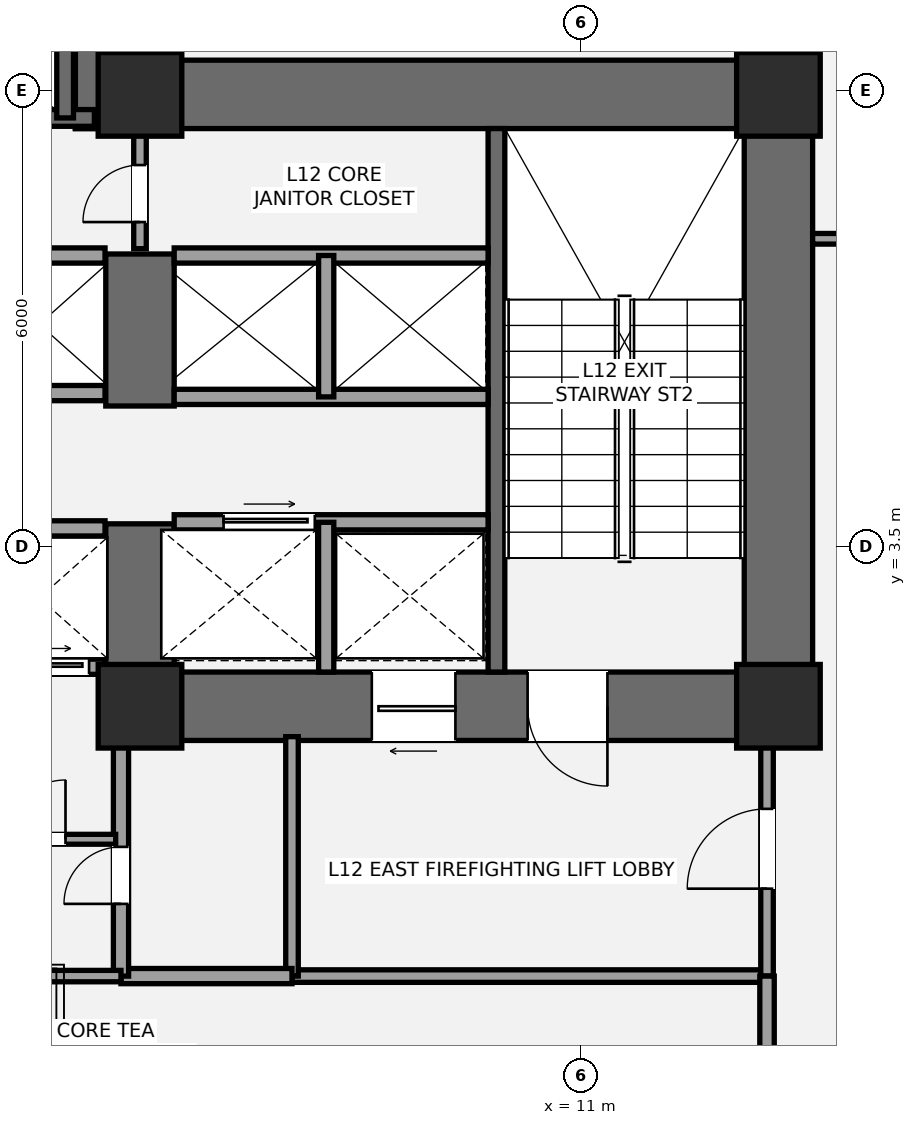
"""IFC4 building model, lengths in metres.
Left out: names, types, materials, properties, quantities, classifications, styles, units other than length and angle.
Written with IfcOpenShell. Run it as: python <this file> out.ifc"""

import sys

from ifc_helpers import new_model, si_unit, direction, frame, frame_2d, origin, origin_2d, place, context, subcontext, project, spatial, rectangle, extrude, element, fill, save


model = new_model("IFC4")
c1 = context("Model", 3, precision=1e-05, world=origin(), true_north=direction((0.0, 1.0)))
c2 = subcontext(c1, "Body", "Model", "MODEL_VIEW")
j1 = project(units=[si_unit("LENGTHUNIT", "METRE"), si_unit("PLANEANGLEUNIT", "RADIAN")], contexts=[c1])
p1 = place(None, origin())
s1 = spatial("IfcSite", under=j1, at=p1, CompositionType="ELEMENT")
p2 = place(p1, origin())
s2 = spatial("IfcBuilding", under=s1, at=p2, CompositionType="ELEMENT")
p3 = place(p2, frame((0.0, 0.0, 48.6)))
s3 = spatial("IfcBuildingStorey", under=s2, at=p3, CompositionType="ELEMENT", Elevation=48.6)
p4 = place(p3, frame((13.6, 0.95, 0.0), z_axis=(0.0, 0.0, 1.0), x_axis=(0.0, 1.0, 0.0)))
e1 = element("IfcWall", 1, at=p4, inside=s3, PredefinedType="SHEAR", context=c2, shape_type="SweptSolid", body=[
    extrude(rectangle(XDim=8.95, YDim=0.9, at=frame_2d((4.475, 0.0))), origin(), (0.0, 0.0, 1.0), 3.6),
])
p5 = place(p3, frame((4.35, 9.45, 0.0), z_axis=(0.0, 0.0, 1.0), x_axis=(1.0, 0.0, 0.0)))
e2 = element("IfcWall", 2, at=p5, inside=s3, PredefinedType="SHEAR", context=c2, shape_type="SweptSolid", body=[
    extrude(rectangle(XDim=9.7, YDim=0.9, at=frame_2d((4.85, 0.0))), origin(), (0.0, 0.0, 1.0), 3.6),
])
p6 = place(p3, frame((14.05, 1.4, 0.0), z_axis=(0.0, 0.0, 1.0), x_axis=(-1.0, 0.0, 0.0)))
e3 = element("IfcWall", 3, at=p6, inside=s3, PredefinedType="SHEAR", context=c2, shape_type="SweptSolid", body=[
    extrude(rectangle(XDim=9.3, YDim=0.9, at=frame_2d((4.65, 0.0))), origin(), (0.0, 0.0, 1.0), 3.6),
])
p7 = place(p6, frame((2.7, 0.0, 0.0)))
e4 = element("IfcOpeningElement", 4, at=p7, cuts=e3, PredefinedType="OPENING", context=c2, shape_type="SweptSolid", body=[
    extrude(rectangle(XDim=1.05, YDim=2.15, at=frame_2d((0.525, 1.075))), frame((0.0, 0.46, 0.0), z_axis=(0.0, -1.0, 0.0), x_axis=(1.0, 0.0, 0.0)), (0.0, 0.0, 1.0), 0.92),
])
p8 = place(p6, frame((4.7, 0.0, 0.0)))
e5 = element("IfcOpeningElement", 5, at=p8, cuts=e3, PredefinedType="OPENING", context=c2, shape_type="SweptSolid", body=[
    extrude(rectangle(XDim=1.1, YDim=2.2, at=frame_2d((0.55, 1.1))), frame((0.0, 0.46, 0.0), z_axis=(0.0, -1.0, 0.0), x_axis=(1.0, 0.0, 0.0)), (0.0, 0.0, 1.0), 0.92),
])
p9 = place(p3, frame((5.2, 0.95, 0.0), z_axis=(0.0, 0.0, 1.0), x_axis=(0.0, 1.0, 0.0)))
e6 = element("IfcWall", 6, at=p9, inside=s3, PredefinedType="SHEAR", context=c2, shape_type="SweptSolid", body=[
    extrude(rectangle(XDim=2.85, YDim=0.9, at=frame_2d((1.425, 0.0))), origin(), (0.0, 0.0, 1.0), 3.6),
])
p10 = place(p3, frame((5.2, 5.35, 0.0), z_axis=(0.0, 0.0, 1.0), x_axis=(0.0, 1.0, 0.0)))
e7 = element("IfcWall", 7, at=p10, inside=s3, PredefinedType="SHEAR", context=c2, shape_type="SweptSolid", body=[
    extrude(rectangle(XDim=2.0, YDim=0.9, at=frame_2d((1.0, 0.0))), origin(), (0.0, 0.0, 1.0), 3.6),
])
p11 = place(p3, frame((9.89, 1.85, 0.0), z_axis=(0.0, 0.0, 1.0), x_axis=(0.0, 1.0, 0.0)))
e8 = element("IfcWall", 8, at=p11, inside=s3, PredefinedType="SHEAR", context=c2, shape_type="SweptSolid", body=[
    extrude(rectangle(XDim=7.15, YDim=0.22, at=frame_2d((3.575, 0.0))), origin(), (0.0, 0.0, 1.0), 3.6),
])
p12 = place(p3, frame((4.8, 9.0, 0.0), z_axis=(0.0, 0.0, 1.0), x_axis=(0.0, 1.0, 0.0)))
e9 = element("IfcWall", 9, at=p12, inside=s3, PredefinedType="SHEAR", context=c2, shape_type="SweptSolid", body=[
    extrude(rectangle(XDim=4.3, YDim=0.9, at=frame_2d((2.15, 0.0))), origin(), (0.0, 0.0, 1.0), 3.6),
])
p13 = place(p3, frame((-4.7, 9.14, 0.0), z_axis=(0.0, 0.0, 1.0), x_axis=(1.0, 0.0, 0.0)))
e10 = element("IfcWall", 10, at=p13, inside=s3, PredefinedType="SHEAR", context=c2, shape_type="SweptSolid", body=[
    extrude(rectangle(XDim=9.3, YDim=0.22, at=frame_2d((4.65, 0.0))), origin(), (0.0, 0.0, 1.0), 3.6),
])
p14 = place(p13, frame((1.15, 0.0, 0.0)))
e11 = element("IfcOpeningElement", 11, at=p14, cuts=e10, PredefinedType="OPENING", context=c2, shape_type="SweptSolid", body=[
    extrude(rectangle(XDim=1.05, YDim=2.15, at=frame_2d((0.525, 1.075))), frame((0.0, 0.12, 0.0), z_axis=(0.0, -1.0, 0.0), x_axis=(1.0, 0.0, 0.0)), (0.0, 0.0, 1.0), 0.24),
])
p15 = place(p3, frame((4.215, 9.14, 0.0), z_axis=(0.0, 0.0, 1.0), x_axis=(0.0, 1.0, 0.0)))
e12 = element("IfcWall", 12, at=p15, inside=s3, PredefinedType="SHEAR", context=c2, shape_type="SweptSolid", body=[
    extrude(rectangle(XDim=3.26, YDim=0.22, at=frame_2d((1.63, 0.0))), origin(), (0.0, 0.0, 1.0), 3.6),
])
for number, where, z_axis, x_axis in (
    (13, (5.2, 1.4, 0.0), (0.0, 0.0, 1.0), (1.0, 0.0, 0.0)),
    (14, (5.2, 9.45, 0.0), (0.0, 0.0, 1.0), (1.0, 0.0, 0.0)),
    (15, (13.6, 1.4, 0.0), (0.0, 0.0, 1.0), (1.0, 0.0, 0.0)),
    (16, (13.6, 9.45, 0.0), (0.0, 0.0, 1.0), (1.0, 0.0, 0.0)),
):
    element("IfcColumn", number, at=place(p3, frame(where, z_axis=z_axis, x_axis=x_axis)), inside=s3, PredefinedType="COLUMN", context=c2, shape_type="SweptSolid", body=[
        extrude(rectangle(XDim=1.1, YDim=1.1, at=origin_2d()), origin(), (0.0, 0.0, 1.0), 3.6),
    ])
p16 = place(p3, frame((7.2, -2.15, 0.0), z_axis=(0.0, 0.0, 1.0), x_axis=(1.0, 0.0, 0.0)))
e17 = element("IfcWall", 17, at=p16, inside=s3, PredefinedType="PARTITIONING", context=c2, shape_type="SweptSolid", body=[
    extrude(rectangle(XDim=6.25, YDim=0.165, at=frame_2d((3.125, 0.0))), origin(), (0.0, 0.0, 1.0), 3.4),
])
p17 = place(p3, frame((7.2, -2.15, 0.0), z_axis=(0.0, 0.0, 1.0), x_axis=(0.0, 1.0, 0.0)))
e18 = element("IfcWall", 18, at=p17, inside=s3, PredefinedType="PARTITIONING", context=c2, shape_type="SweptSolid", body=[
    extrude(rectangle(XDim=3.15, YDim=0.165, at=frame_2d((1.575, 0.0))), origin(), (0.0, 0.0, 1.0), 2.853),
])
p18 = place(p3, frame((13.45, -2.15, 0.0), z_axis=(0.0, 0.0, 1.0), x_axis=(0.0, 1.0, 0.0)))
e19 = element("IfcWall", 19, at=p18, inside=s3, PredefinedType="PARTITIONING", context=c2, shape_type="SweptSolid", body=[
    extrude(rectangle(XDim=3.15, YDim=0.165, at=frame_2d((1.575, 0.0))), origin(), (0.0, 0.0, 1.0), 2.853),
])
p19 = place(p18, frame((1.15, 0.0, 0.0)))
e20 = element("IfcOpeningElement", 20, at=p19, cuts=e19, PredefinedType="OPENING", context=c2, shape_type="SweptSolid", body=[
    extrude(rectangle(XDim=1.05, YDim=2.15, at=frame_2d((0.525, 1.075))), frame((0.0, 0.093, 0.0), z_axis=(0.0, -1.0, 0.0), x_axis=(1.0, 0.0, 0.0)), (0.0, 0.0, 1.0), 0.185),
])
p20 = place(p3, frame((4.95, -2.15, 0.0), z_axis=(0.0, 0.0, 1.0), x_axis=(1.0, 0.0, 0.0)))
e21 = element("IfcWall", 21, at=p20, inside=s3, PredefinedType="SOLIDWALL", context=c2, shape_type="SweptSolid", body=[
    extrude(rectangle(XDim=2.25, YDim=0.2, at=frame_2d((1.125, 0.0))), origin(), (0.0, 0.0, 1.0), 3.4),
])
p21 = place(p3, frame((4.95, -2.15, 0.0), z_axis=(0.0, 0.0, 1.0), x_axis=(0.0, 1.0, 0.0)))
e22 = element("IfcWall", 22, at=p21, inside=s3, PredefinedType="SOLIDWALL", context=c2, shape_type="SweptSolid", body=[
    extrude(rectangle(XDim=3.15, YDim=0.2, at=frame_2d((1.575, 0.0))), origin(), (0.0, 0.0, 1.0), 3.4),
])
p22 = place(p21, frame((0.95, 0.0, 0.0)))
e23 = element("IfcOpeningElement", 23, at=p22, cuts=e22, PredefinedType="OPENING", context=c2, shape_type="SweptSolid", body=[
    extrude(rectangle(XDim=0.75, YDim=2.1, at=frame_2d((0.375, 1.05))), frame((0.0, 0.11, 0.0), z_axis=(0.0, -1.0, 0.0), x_axis=(1.0, 0.0, 0.0)), (0.0, 0.0, 1.0), 0.22),
])
p23 = place(p3, frame((2.89, -0.35, 0.0), z_axis=(0.0, 0.0, 1.0), x_axis=(1.0, 0.0, 0.0)))
e24 = element("IfcWall", 24, at=p23, inside=s3, PredefinedType="PARTITIONING", context=c2, shape_type="SweptSolid", body=[
    extrude(rectangle(XDim=1.99, YDim=0.13, at=frame_2d((0.995, 0.0))), origin(), (0.0, 0.0, 1.0), 3.4),
])
p24 = place(p23, frame((0.55, 0.0, 0.0)))
e25 = element("IfcOpeningElement", 25, at=p24, cuts=e24, PredefinedType="OPENING", context=c2, shape_type="SweptSolid", body=[
    extrude(rectangle(XDim=0.78, YDim=2.1, at=frame_2d((0.39, 1.05))), frame((0.0, 0.075, 0.0), z_axis=(0.0, -1.0, 0.0), x_axis=(1.0, 0.0, 0.0)), (0.0, 0.0, 1.0), 0.15),
])
p25 = place(p3, frame((5.65, 3.82, 0.0), z_axis=(0.0, 0.0, 1.0), x_axis=(1.0, 0.0, 0.0)))
e26 = element("IfcWall", 26, at=p25, inside=s3, PredefinedType="SOLIDWALL", context=c2, shape_type="SweptSolid", body=[
    extrude(rectangle(XDim=4.13, YDim=0.2, at=frame_2d((2.065, 0.0))), origin(), (0.0, 0.0, 1.0), 3.4),
])
p26 = place(p25, frame((0.65, 0.0, 0.0)))
e27 = element("IfcOpeningElement", 27, at=p26, cuts=e26, PredefinedType="OPENING", context=c2, shape_type="SweptSolid", body=[
    extrude(rectangle(XDim=1.2, YDim=2.2, at=frame_2d((0.6, 1.1))), frame((0.0, 0.11, 0.0), z_axis=(0.0, -1.0, 0.0), x_axis=(1.0, 0.0, 0.0)), (0.0, 0.0, 1.0), 0.22),
])
p27 = place(p3, frame((7.65, 1.85, 0.0), z_axis=(0.0, 0.0, 1.0), x_axis=(0.0, 1.0, 0.0)))
e28 = element("IfcWall", 28, at=p27, inside=s3, PredefinedType="SOLIDWALL", context=c2, shape_type="SweptSolid", body=[
    extrude(rectangle(XDim=1.97, YDim=0.2, at=frame_2d((0.985, 0.0))), origin(), (0.0, 0.0, 1.0), 3.4),
])
for number, where, z_axis, x_axis in (
    (29, (5.65, 5.47, 0.0), (0.0, 0.0, 1.0), (1.0, 0.0, 0.0)),
    (30, (5.65, 7.33, 0.0), (0.0, 0.0, 1.0), (1.0, 0.0, 0.0)),
):
    element("IfcWall", number, at=place(p3, frame(where, z_axis=z_axis, x_axis=x_axis)), inside=s3, PredefinedType="SOLIDWALL", context=c2, shape_type="SweptSolid", body=[
        extrude(rectangle(XDim=4.13, YDim=0.2, at=frame_2d((2.065, 0.0))), origin(), (0.0, 0.0, 1.0), 3.4),
    ])
p28 = place(p3, frame((7.65, 5.47, 0.0), z_axis=(0.0, 0.0, 1.0), x_axis=(0.0, 1.0, 0.0)))
e31 = element("IfcWall", 31, at=p28, inside=s3, PredefinedType="SOLIDWALL", context=c2, shape_type="SweptSolid", body=[
    extrude(rectangle(XDim=1.86, YDim=0.2, at=frame_2d((0.93, 0.0))), origin(), (0.0, 0.0, 1.0), 3.4),
])
p29 = place(p3, frame((0.88, 1.92, 0.0), z_axis=(0.0, 0.0, 1.0), x_axis=(1.0, 0.0, 0.0)))
e32 = element("IfcWall", 32, at=p29, inside=s3, PredefinedType="SOLIDWALL", context=c2, shape_type="SweptSolid", body=[
    extrude(rectangle(XDim=3.86, YDim=0.2, at=frame_2d((1.93, 0.0))), origin(), (0.0, 0.0, 1.0), 2.39),
])
p30 = place(p29, frame((0.55, 0.0, 0.0)))
e33 = element("IfcOpeningElement", 33, at=p30, cuts=e32, PredefinedType="OPENING", context=c2, shape_type="SweptSolid", body=[
    extrude(rectangle(XDim=1.1, YDim=2.2, at=frame_2d((0.55, 1.1))), frame((0.0, 0.11, 0.0), z_axis=(0.0, -1.0, 0.0), x_axis=(1.0, 0.0, 0.0)), (0.0, 0.0, 1.0), 0.22),
])
p31 = place(p29, frame((2.55, 0.0, 0.0)))
e34 = element("IfcOpeningElement", 34, at=p31, cuts=e32, PredefinedType="OPENING", context=c2, shape_type="SweptSolid", body=[
    extrude(rectangle(XDim=1.1, YDim=2.2, at=frame_2d((0.55, 1.1))), frame((0.0, 0.11, 0.0), z_axis=(0.0, -1.0, 0.0), x_axis=(1.0, 0.0, 0.0)), (0.0, 0.0, 1.0), 0.22),
])
for number, where, z_axis, x_axis in (
    (35, (0.88, 3.74, 0.0), (0.0, 0.0, 1.0), (1.0, 0.0, 0.0)),
    (36, (0.88, 5.52, 0.0), (0.0, 0.0, 1.0), (1.0, 0.0, 0.0)),
    (37, (0.88, 7.33, 0.0), (0.0, 0.0, 1.0), (1.0, 0.0, 0.0)),
):
    element("IfcWall", number, at=place(p3, frame(where, z_axis=z_axis, x_axis=x_axis)), inside=s3, PredefinedType="SOLIDWALL", context=c2, shape_type="SweptSolid", body=[
        extrude(rectangle(XDim=3.86, YDim=0.2, at=frame_2d((1.93, 0.0))), origin(), (0.0, 0.0, 1.0), 3.4),
    ])
p32 = place(p3, frame((5.2, 7.42, 0.0), z_axis=(0.0, 0.0, 1.0), x_axis=(0.0, 1.0, 0.0)))
e38 = element("IfcWall", 38, at=p32, inside=s3, PredefinedType="PARTITIONING", context=c2, shape_type="SweptSolid", body=[
    extrude(rectangle(XDim=1.58, YDim=0.165, at=frame_2d((0.79, 0.0))), origin(), (0.0, 0.0, 1.0), 3.4),
])
p33 = place(p32, frame((0.35, 0.0, 0.0)))
e39 = element("IfcOpeningElement", 39, at=p33, cuts=e38, PredefinedType="OPENING", context=c2, shape_type="SweptSolid", body=[
    extrude(rectangle(XDim=0.75, YDim=2.1, at=frame_2d((0.375, 1.05))), frame((0.0, 0.093, 0.0), z_axis=(0.0, -1.0, 0.0), x_axis=(1.0, 0.0, 0.0)), (0.0, 0.0, 1.0), 0.185),
])
p34 = place(p3, frame((2.1, -2.15, 0.0), z_axis=(0.0, 0.0, 1.0), x_axis=(1.0, 0.0, 0.0)))
e40 = element("IfcWall", 40, at=p34, inside=s3, PredefinedType="PLUMBINGWALL", context=c2, shape_type="SweptSolid", body=[
    extrude(rectangle(XDim=2.85, YDim=0.15, at=frame_2d((1.425, 0.0))), origin(), (0.0, 0.0, 1.0), 3.4),
])
p35 = place(p3, frame((13.45, -4.05, 0.0), z_axis=(0.0, 0.0, 1.0), x_axis=(0.0, 1.0, 0.0)))
e41 = element("IfcWall", 41, at=p35, inside=s3, PredefinedType="PLUMBINGWALL", context=c2, shape_type="SweptSolid", body=[
    extrude(rectangle(XDim=1.9, YDim=0.19, at=frame_2d((0.95, 0.0))), origin(), (0.0, 0.0, 1.0), 2.853),
])
p36 = place(p3, frame((14.05, 7.55, 0.0), z_axis=(0.0, 0.0, 1.0), x_axis=(1.0, 0.0, 0.0)))
e42 = element("IfcWall", 42, at=p36, inside=s3, PredefinedType="PARTITIONING", context=c2, shape_type="SweptSolid", body=[
    extrude(rectangle(XDim=10.806, YDim=0.14, at=frame_2d((5.403, 0.0))), origin(), (0.0, 0.0, 1.0), 2.853),
])
p37 = place(p36, frame((1.2, 0.0, 0.0)))
e43 = element("IfcOpeningElement", 43, at=p37, cuts=e42, PredefinedType="OPENING", context=c2, shape_type="SweptSolid", body=[
    extrude(rectangle(XDim=0.92, YDim=2.15, at=frame_2d((0.46, 1.075))), frame((0.0, 0.08, 0.0), z_axis=(0.0, -1.0, 0.0), x_axis=(1.0, 0.0, 0.0)), (0.0, 0.0, 1.0), 0.16),
])
p38 = place(p7, origin())
e44 = element("IfcDoor", 44, at=p38, inside=s3, OperationType="SINGLE_SWING_LEFT", PredefinedType="DOOR", context=c2, shape_type="SweptSolid", body=[
    extrude(rectangle(XDim=1.05, YDim=2.15, at=frame_2d((0.525, 1.075))), frame((0.0, 0.025, 0.0), z_axis=(0.0, -1.0, 0.0), x_axis=(1.0, 0.0, 0.0)), (0.0, 0.0, 1.0), 0.05),
])
fill(e4, e44)
p39 = place(p19, origin())
e45 = element("IfcDoor", 45, at=p39, inside=s3, OperationType="SINGLE_SWING_LEFT", PredefinedType="DOOR", context=c2, shape_type="SweptSolid", body=[
    extrude(rectangle(XDim=1.05, YDim=2.15, at=frame_2d((0.525, 1.075))), frame((0.0, 0.025, 0.0), z_axis=(0.0, -1.0, 0.0), x_axis=(1.0, 0.0, 0.0)), (0.0, 0.0, 1.0), 0.05),
])
fill(e20, e45)
p40 = place(p22, origin())
e46 = element("IfcDoor", 46, at=p40, inside=s3, OperationType="SINGLE_SWING_LEFT", PredefinedType="DOOR", context=c2, shape_type="SweptSolid", body=[
    extrude(rectangle(XDim=0.75, YDim=2.1, at=frame_2d((0.375, 1.05))), frame((0.0, 0.025, 0.0), z_axis=(0.0, -1.0, 0.0), x_axis=(1.0, 0.0, 0.0)), (0.0, 0.0, 1.0), 0.05),
])
fill(e23, e46)
p41 = place(p24, origin())
e47 = element("IfcDoor", 47, at=p41, inside=s3, OperationType="SINGLE_SWING_RIGHT", PredefinedType="DOOR", context=c2, shape_type="SweptSolid", body=[
    extrude(rectangle(XDim=0.78, YDim=2.1, at=frame_2d((0.39, 1.05))), frame((0.0, 0.025, 0.0), z_axis=(0.0, -1.0, 0.0), x_axis=(1.0, 0.0, 0.0)), (0.0, 0.0, 1.0), 0.05),
])
fill(e25, e47)
p42 = place(p8, origin())
e48 = element("IfcDoor", 48, at=p42, inside=s3, OperationType="SLIDING_TO_LEFT", PredefinedType="DOOR", context=c2, shape_type="SweptSolid", body=[
    extrude(rectangle(XDim=1.1, YDim=2.2, at=frame_2d((0.55, 1.1))), frame((0.0, 0.025, 0.0), z_axis=(0.0, -1.0, 0.0), x_axis=(1.0, 0.0, 0.0)), (0.0, 0.0, 1.0), 0.05),
])
fill(e5, e48)
p43 = place(p26, origin())
e49 = element("IfcDoor", 49, at=p43, inside=s3, OperationType="SLIDING_TO_RIGHT", PredefinedType="DOOR", context=c2, shape_type="SweptSolid", body=[
    extrude(rectangle(XDim=1.2, YDim=2.2, at=frame_2d((0.6, 1.1))), frame((0.0, 0.025, 0.0), z_axis=(0.0, -1.0, 0.0), x_axis=(1.0, 0.0, 0.0)), (0.0, 0.0, 1.0), 0.05),
])
fill(e27, e49)
p44 = place(p31, origin())
e50 = element("IfcDoor", 50, at=p44, inside=s3, OperationType="SLIDING_TO_LEFT", PredefinedType="DOOR", context=c2, shape_type="SweptSolid", body=[
    extrude(rectangle(XDim=1.1, YDim=2.2, at=frame_2d((0.55, 1.1))), frame((0.0, 0.025, 0.0), z_axis=(0.0, -1.0, 0.0), x_axis=(1.0, 0.0, 0.0)), (0.0, 0.0, 1.0), 0.05),
])
fill(e34, e50)
p45 = place(p33, origin())
e51 = element("IfcDoor", 51, at=p45, inside=s3, OperationType="SINGLE_SWING_LEFT", PredefinedType="DOOR", context=c2, shape_type="SweptSolid", body=[
    extrude(rectangle(XDim=0.75, YDim=2.1, at=frame_2d((0.375, 1.05))), frame((0.0, 0.025, 0.0), z_axis=(0.0, -1.0, 0.0), x_axis=(1.0, 0.0, 0.0)), (0.0, 0.0, 1.0), 0.05),
])
fill(e39, e51)
save(model, sys.argv[1])
